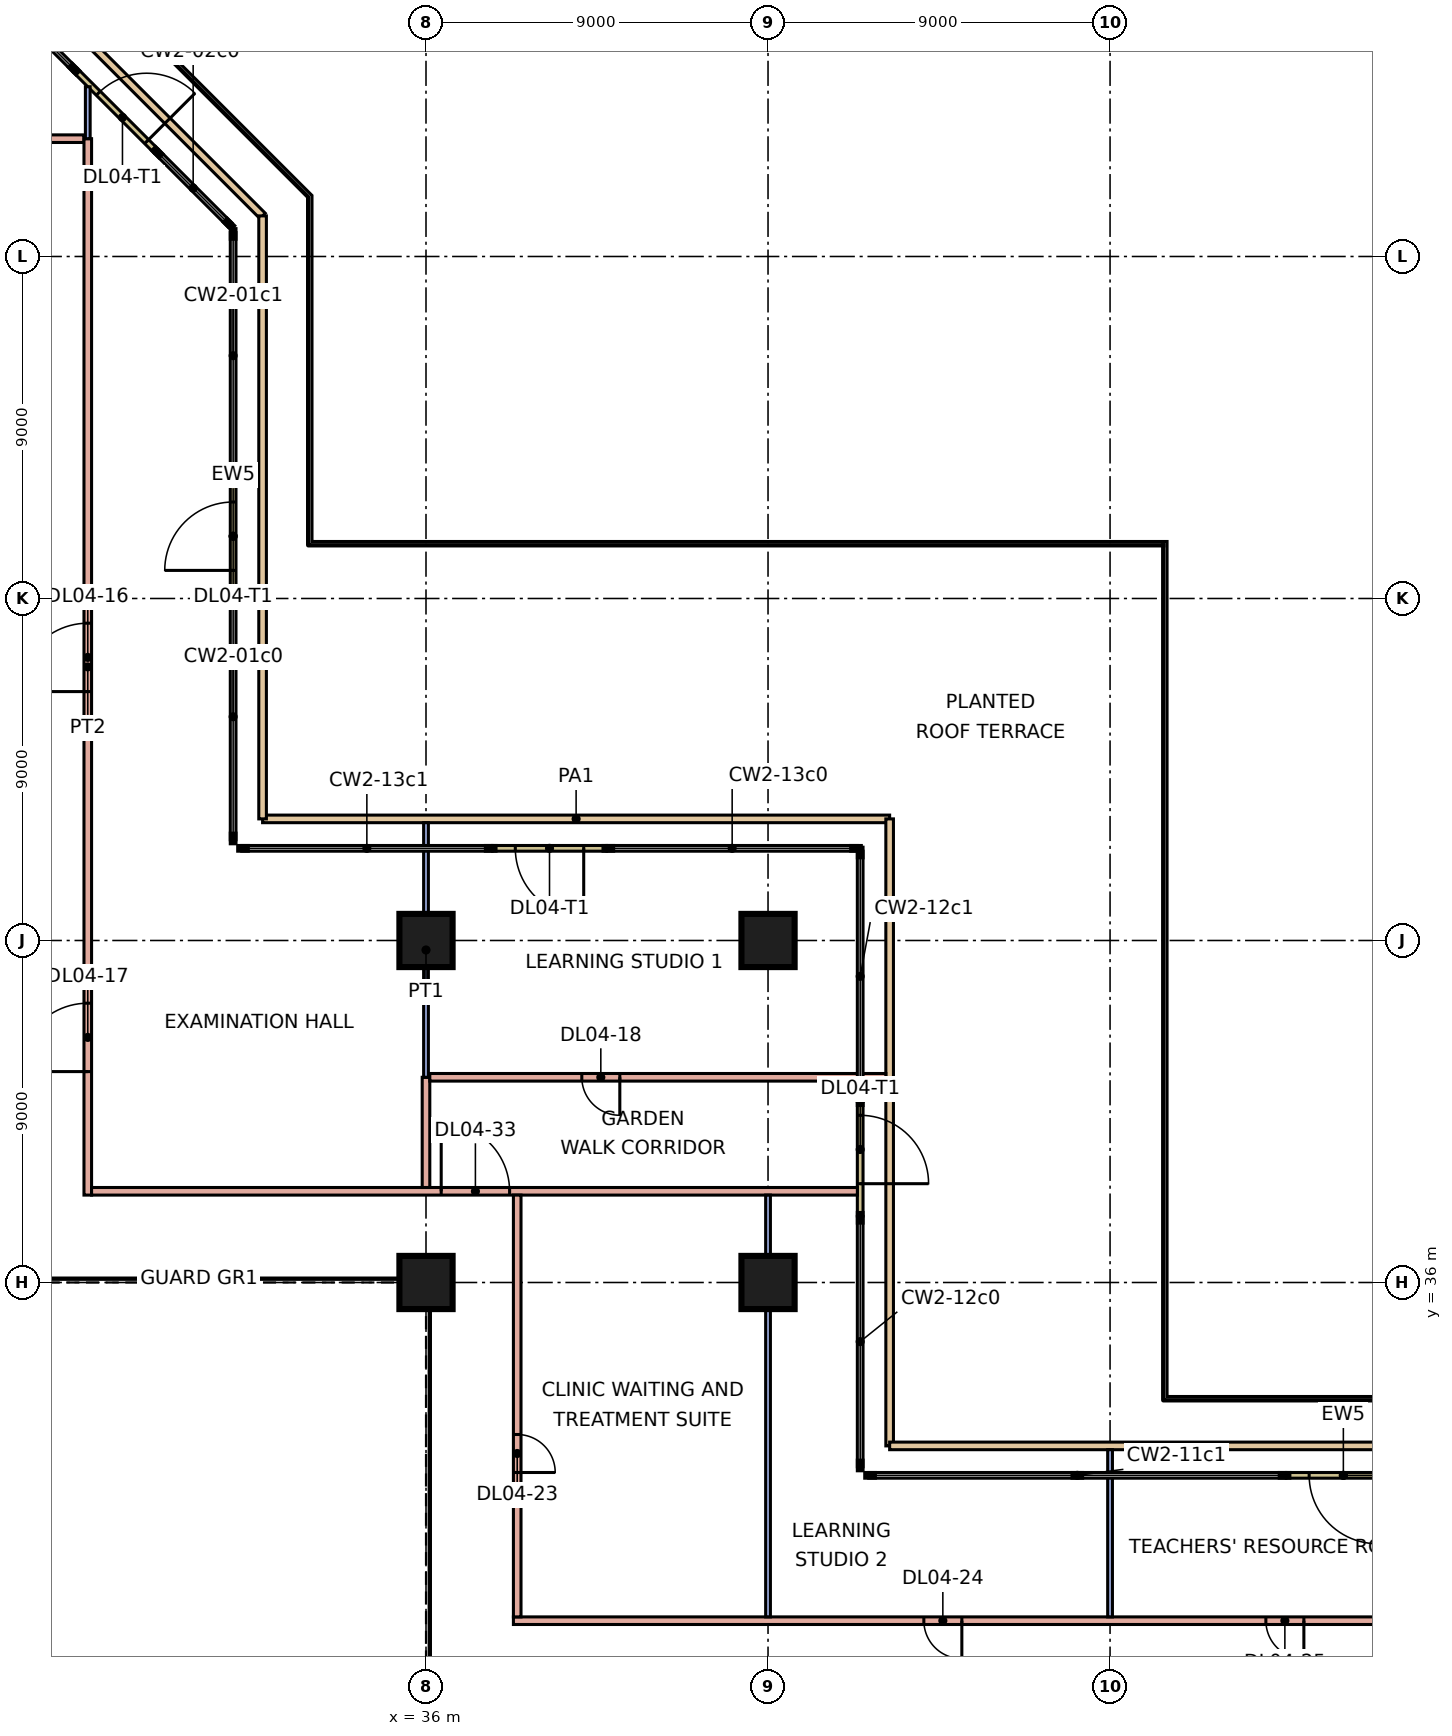
"""IFC4 building model, lengths in metres.
Left out: names, types, materials, properties, quantities, classifications, styles, units other than length and angle.
Written with IfcOpenShell. Run it as: python <this file> out.ifc"""

import sys

from ifc_helpers import new_model, si_unit, direction, frame, frame_2d, origin, origin_2d, place, context, subcontext, project, spatial, rectangle, extrude, element, fill, save


model = new_model("IFC4")
c1 = context("Model", 3, precision=1e-05, world=origin(), true_north=direction((0.0, 1.0)))
c2 = subcontext(c1, "Body", "Model", "MODEL_VIEW")
j1 = project(units=[si_unit("LENGTHUNIT", "METRE"), si_unit("PLANEANGLEUNIT", "RADIAN")], contexts=[c1])
p1 = place(None, origin())
s1 = spatial("IfcSite", under=j1, at=p1, CompositionType="ELEMENT")
p2 = place(p1, origin())
s2 = spatial("IfcBuilding", under=s1, at=p2, CompositionType="ELEMENT")
p3 = place(p2, frame((0.0, 0.0, 21.6)))
s3 = spatial("IfcBuildingStorey", under=s2, at=p3, CompositionType="ELEMENT", Elevation=21.6)
for number, where, z_axis, x_axis in (
    (1, (36.0, 36.0, 0.0), (0.0, 0.0, 1.0), (1.0, 0.0, 0.0)),
    (2, (45.0, 36.0, 0.0), (0.0, 0.0, 1.0), (1.0, 0.0, 0.0)),
    (3, (36.0, 45.0, 0.0), (0.0, 0.0, 1.0), (1.0, 0.0, 0.0)),
    (4, (45.0, 45.0, 0.0), (0.0, 0.0, 1.0), (1.0, 0.0, 0.0)),
):
    element("IfcColumn", number, at=place(p3, frame(where, z_axis=z_axis, x_axis=x_axis)), inside=s3, PredefinedType="COLUMN", context=c2, shape_type="SweptSolid", body=[
        extrude(rectangle(XDim=1.4, YDim=1.4, at=origin_2d()), origin(), (0.0, 0.0, 1.0), 4.8),
    ])
p4 = place(p3, frame((30.925, 54.139, 0.0), z_axis=(0.0, 0.0, 1.0), x_axis=(0.0, 1.0, 0.0)))
e5 = element("IfcWall", 5, at=p4, inside=s3, PredefinedType="SOLIDWALL", context=c2, shape_type="SweptSolid", body=[
    extrude(rectangle(XDim=3.0, YDim=0.15, at=frame_2d((1.5, 0.0))), origin(), (0.0, 0.0, 1.0), 4.4),
])
p5 = place(p4, frame((0.6, 0.0, 0.0)))
e6 = element("IfcOpeningElement", 6, at=p5, cuts=e5, PredefinedType="OPENING", context=c2, shape_type="SweptSolid", body=[
    extrude(rectangle(XDim=1.8, YDim=2.4, at=frame_2d((0.9, 1.2))), frame((0.0, 0.085, 0.0), z_axis=(0.0, -1.0, 0.0), x_axis=(1.0, 0.0, 0.0)), (0.0, 0.0, 1.0), 0.17),
])
p6 = place(p3, frame((28.897, 65.775, 0.0), z_axis=(0.0, 0.0, 1.0), x_axis=(-0.707106781187, 0.707106781187, 0.0)))
e7 = element("IfcWall", 7, at=p6, inside=s3, PredefinedType="SOLIDWALL", context=c2, shape_type="SweptSolid", body=[
    extrude(rectangle(XDim=3.0, YDim=0.15, at=frame_2d((1.5, 0.0))), origin(), (0.0, 0.0, 1.0), 4.4),
])
p7 = place(p6, frame((0.35, 0.0, 0.0)))
e8 = element("IfcOpeningElement", 8, at=p7, cuts=e7, PredefinedType="OPENING", context=c2, shape_type="SweptSolid", body=[
    extrude(rectangle(XDim=1.8, YDim=2.4, at=frame_2d((0.9, 1.2))), frame((0.0, 0.085, 0.0), z_axis=(0.0, -1.0, 0.0), x_axis=(1.0, 0.0, 0.0)), (0.0, 0.0, 1.0), 0.17),
])
p8 = place(p3, frame((61.639, 30.925, 0.0), z_axis=(0.0, 0.0, 1.0), x_axis=(-1.0, 0.0, 0.0)))
e9 = element("IfcWall", 9, at=p8, inside=s3, PredefinedType="SOLIDWALL", context=c2, shape_type="SweptSolid", body=[
    extrude(rectangle(XDim=3.0, YDim=0.15, at=frame_2d((1.5, 0.0))), origin(), (0.0, 0.0, 1.0), 4.4),
])
p9 = place(p8, frame((0.6, 0.0, 0.0)))
e10 = element("IfcOpeningElement", 10, at=p9, cuts=e9, PredefinedType="OPENING", context=c2, shape_type="SweptSolid", body=[
    extrude(rectangle(XDim=1.8, YDim=2.4, at=frame_2d((0.9, 1.2))), frame((0.0, 0.085, 0.0), z_axis=(0.0, -1.0, 0.0), x_axis=(1.0, 0.0, 0.0)), (0.0, 0.0, 1.0), 0.17),
])
p10 = place(p3, frame((47.425, 37.75, 0.0), z_axis=(0.0, 0.0, 1.0), x_axis=(0.0, 1.0, 0.0)))
e11 = element("IfcWall", 11, at=p10, inside=s3, PredefinedType="SOLIDWALL", context=c2, shape_type="SweptSolid", body=[
    extrude(rectangle(XDim=3.0, YDim=0.15, at=frame_2d((1.5, 0.0))), origin(), (0.0, 0.0, 1.0), 4.4),
])
p11 = place(p10, frame((0.85, 0.0, 0.0)))
e12 = element("IfcOpeningElement", 12, at=p11, cuts=e11, PredefinedType="OPENING", context=c2, shape_type="SweptSolid", body=[
    extrude(rectangle(XDim=1.8, YDim=2.4, at=frame_2d((0.9, 1.2))), frame((0.0, 0.085, 0.0), z_axis=(0.0, -1.0, 0.0), x_axis=(1.0, 0.0, 0.0)), (0.0, 0.0, 1.0), 0.17),
])
p12 = place(p3, frame((40.75, 47.425, 0.0), z_axis=(0.0, 0.0, 1.0), x_axis=(-1.0, 0.0, 0.0)))
e13 = element("IfcWall", 13, at=p12, inside=s3, PredefinedType="SOLIDWALL", context=c2, shape_type="SweptSolid", body=[
    extrude(rectangle(XDim=3.0, YDim=0.15, at=frame_2d((1.5, 0.0))), origin(), (0.0, 0.0, 1.0), 4.4),
])
p13 = place(p12, frame((0.6, 0.0, 0.0)))
e14 = element("IfcOpeningElement", 14, at=p13, cuts=e13, PredefinedType="OPENING", context=c2, shape_type="SweptSolid", body=[
    extrude(rectangle(XDim=1.8, YDim=2.4, at=frame_2d((0.9, 1.2))), frame((0.0, 0.085, 0.0), z_axis=(0.0, -1.0, 0.0), x_axis=(1.0, 0.0, 0.0)), (0.0, 0.0, 1.0), 0.17),
])
for number, where, z_axis, x_axis in (
    (15, (31.7, 48.2, 0.0), (0.0, 0.0, 1.0), (1.0, 0.0, 0.0)),
    (16, (48.2, 48.2, 0.0), (0.0, 0.0, 1.0), (0.0, -1.0, 0.0)),
):
    element("IfcWall", number, at=place(p3, frame(where, z_axis=z_axis, x_axis=x_axis)), inside=s3, PredefinedType="PARAPET", context=c2, shape_type="SweptSolid", body=[
        extrude(rectangle(XDim=16.5, YDim=0.2, at=frame_2d((8.25, 0.0))), origin(), (0.0, 0.0, 1.0), 0.5),
    ])
p14 = place(p3, frame((48.2, 31.7, 0.0), z_axis=(0.0, 0.0, 1.0), x_axis=(1.0, 0.0, 0.0)))
e17 = element("IfcWall", 17, at=p14, inside=s3, PredefinedType="PARAPET", context=c2, shape_type="SweptSolid", body=[
    extrude(rectangle(XDim=24.868, YDim=0.2, at=frame_2d((12.434, 0.0))), origin(), (0.0, 0.0, 1.0), 0.5),
])
p15 = place(p3, frame((25.068, 70.7, 0.0), z_axis=(0.0, 0.0, 1.0), x_axis=(0.707106781187, -0.707106781187, 0.0)))
e18 = element("IfcWall", 18, at=p15, inside=s3, PredefinedType="PARAPET", context=c2, shape_type="SweptSolid", body=[
    extrude(rectangle(XDim=9.379, YDim=0.2, at=frame_2d((4.689, 0.0))), origin(), (0.0, 0.0, 1.0), 0.5),
])
p16 = place(p3, frame((31.7, 64.068, 0.0), z_axis=(0.0, 0.0, 1.0), x_axis=(0.0, -1.0, 0.0)))
e19 = element("IfcWall", 19, at=p16, inside=s3, PredefinedType="PARAPET", context=c2, shape_type="SweptSolid", body=[
    extrude(rectangle(XDim=15.868, YDim=0.2, at=frame_2d((7.934, 0.0))), origin(), (0.0, 0.0, 1.0), 0.5),
])
p17 = place(p3, frame((-3.0, 66.1, 0.0), z_axis=(0.0, 0.0, 1.0), x_axis=(1.0, 0.0, 0.0)))
e20 = element("IfcWall", 20, at=p17, inside=s3, PredefinedType="PARTITIONING", context=c2, shape_type="SweptSolid", body=[
    extrude(rectangle(XDim=30.0, YDim=0.2, at=frame_2d((15.0, 0.0))), origin(), (0.0, 0.0, 1.0), 4.4),
])
p18 = place(p17, frame((8.6, 0.0, 0.0)))
e21 = element("IfcOpeningElement", 21, at=p18, cuts=e20, PredefinedType="OPENING", context=c2, shape_type="SweptSolid", body=[
    extrude(rectangle(XDim=1.0, YDim=2.1, at=frame_2d((0.5, 1.05))), frame((0.0, 0.11, 0.0), z_axis=(0.0, -1.0, 0.0), x_axis=(1.0, 0.0, 0.0)), (0.0, 0.0, 1.0), 0.22),
])
p19 = place(p17, frame((22.35, 0.0, 0.0)))
e22 = element("IfcOpeningElement", 22, at=p19, cuts=e20, PredefinedType="OPENING", context=c2, shape_type="SweptSolid", body=[
    extrude(rectangle(XDim=1.0, YDim=2.1, at=frame_2d((0.5, 1.05))), frame((0.0, 0.11, 0.0), z_axis=(0.0, -1.0, 0.0), x_axis=(1.0, 0.0, 0.0)), (0.0, 0.0, 1.0), 0.22),
])
p20 = place(p3, frame((27.1, 38.3, 0.0), z_axis=(0.0, 0.0, 1.0), x_axis=(0.0, 1.0, 0.0)))
e23 = element("IfcWall", 23, at=p20, inside=s3, PredefinedType="PARTITIONING", context=c2, shape_type="SweptSolid", body=[
    extrude(rectangle(XDim=27.8, YDim=0.2, at=frame_2d((13.9, 0.0))), origin(), (0.0, 0.0, 1.0), 4.4),
])
p21 = place(p20, frame((13.25, 0.0, 0.0)))
e24 = element("IfcOpeningElement", 24, at=p21, cuts=e23, PredefinedType="OPENING", context=c2, shape_type="SweptSolid", body=[
    extrude(rectangle(XDim=1.8, YDim=2.1, at=frame_2d((0.9, 1.05))), frame((0.0, 0.11, 0.0), z_axis=(0.0, -1.0, 0.0), x_axis=(1.0, 0.0, 0.0)), (0.0, 0.0, 1.0), 0.22),
])
p22 = place(p20, frame((3.25, 0.0, 0.0)))
e25 = element("IfcOpeningElement", 25, at=p22, cuts=e23, PredefinedType="OPENING", context=c2, shape_type="SweptSolid", body=[
    extrude(rectangle(XDim=1.8, YDim=2.1, at=frame_2d((0.9, 1.05))), frame((0.0, 0.11, 0.0), z_axis=(0.0, -1.0, 0.0), x_axis=(1.0, 0.0, 0.0)), (0.0, 0.0, 1.0), 0.22),
])
p23 = place(p3, frame((27.1, 66.1, 0.0), z_axis=(0.0, 0.0, 1.0), x_axis=(0.0, 1.0, 0.0)))
e26 = element("IfcWall", 26, at=p23, inside=s3, PredefinedType="PARTITIONING", context=c2, shape_type="SweptSolid", body=[
    extrude(rectangle(XDim=1.367, YDim=0.125, at=frame_2d((0.684, 0.0))), origin(), (0.0, 0.0, 1.0), 4.4),
])
p24 = place(p3, frame((27.2, 38.4, 0.0), z_axis=(0.0, 0.0, 1.0), x_axis=(1.0, 0.0, 0.0)))
e27 = element("IfcWall", 27, at=p24, inside=s3, PredefinedType="PARTITIONING", context=c2, shape_type="SweptSolid", body=[
    extrude(rectangle(XDim=20.151, YDim=0.2, at=frame_2d((10.076, 0.0))), origin(), (0.0, 0.0, 1.0), 4.4),
])
p25 = place(p24, frame((9.2, 0.0, 0.0)))
e28 = element("IfcOpeningElement", 28, at=p25, cuts=e27, PredefinedType="OPENING", context=c2, shape_type="SweptSolid", body=[
    extrude(rectangle(XDim=1.8, YDim=2.1, at=frame_2d((0.9, 1.05))), frame((0.0, 0.11, 0.0), z_axis=(0.0, -1.0, 0.0), x_axis=(1.0, 0.0, 0.0)), (0.0, 0.0, 1.0), 0.22),
])
p26 = place(p3, frame((36.0, 38.5, 0.0), z_axis=(0.0, 0.0, 1.0), x_axis=(0.0, 1.0, 0.0)))
e29 = element("IfcWall", 29, at=p26, inside=s3, PredefinedType="PARTITIONING", context=c2, shape_type="SweptSolid", body=[
    extrude(rectangle(XDim=2.9, YDim=0.2, at=frame_2d((1.45, 0.0))), origin(), (0.0, 0.0, 1.0), 4.4),
])
p27 = place(p3, frame((36.0, 41.4, 0.0), z_axis=(0.0, 0.0, 1.0), x_axis=(0.0, 1.0, 0.0)))
e30 = element("IfcWall", 30, at=p27, inside=s3, PredefinedType="PARTITIONING", context=c2, shape_type="SweptSolid", body=[
    extrude(rectangle(XDim=6.7, YDim=0.125, at=frame_2d((3.35, 0.0))), origin(), (0.0, 0.0, 1.0), 4.4),
])
p28 = place(p3, frame((36.1, 41.4, 0.0), z_axis=(0.0, 0.0, 1.0), x_axis=(1.0, 0.0, 0.0)))
e31 = element("IfcWall", 31, at=p28, inside=s3, PredefinedType="PARTITIONING", context=c2, shape_type="SweptSolid", body=[
    extrude(rectangle(XDim=12.0, YDim=0.2, at=frame_2d((6.0, 0.0))), origin(), (0.0, 0.0, 1.0), 4.4),
])
p29 = place(p28, frame((4.0, 0.0, 0.0)))
e32 = element("IfcOpeningElement", 32, at=p29, cuts=e31, PredefinedType="OPENING", context=c2, shape_type="SweptSolid", body=[
    extrude(rectangle(XDim=1.0, YDim=2.1, at=frame_2d((0.5, 1.05))), frame((0.0, 0.11, 0.0), z_axis=(0.0, -1.0, 0.0), x_axis=(1.0, 0.0, 0.0)), (0.0, 0.0, 1.0), 0.22),
])
p30 = place(p3, frame((38.3, 27.1, 0.0), z_axis=(0.0, 0.0, 1.0), x_axis=(1.0, 0.0, 0.0)))
e33 = element("IfcWall", 33, at=p30, inside=s3, PredefinedType="PARTITIONING", context=c2, shape_type="SweptSolid", body=[
    extrude(rectangle(XDim=36.9, YDim=0.2, at=frame_2d((18.45, 0.0))), origin(), (0.0, 0.0, 1.0), 4.4),
])
p31 = place(p30, frame((10.8, 0.0, 0.0)))
e34 = element("IfcOpeningElement", 34, at=p31, cuts=e33, PredefinedType="OPENING", context=c2, shape_type="SweptSolid", body=[
    extrude(rectangle(XDim=1.0, YDim=2.1, at=frame_2d((0.5, 1.05))), frame((0.0, 0.11, 0.0), z_axis=(0.0, -1.0, 0.0), x_axis=(1.0, 0.0, 0.0)), (0.0, 0.0, 1.0), 0.22),
])
p32 = place(p30, frame((19.8, 0.0, 0.0)))
e35 = element("IfcOpeningElement", 35, at=p32, cuts=e33, PredefinedType="OPENING", context=c2, shape_type="SweptSolid", body=[
    extrude(rectangle(XDim=1.0, YDim=2.1, at=frame_2d((0.5, 1.05))), frame((0.0, 0.11, 0.0), z_axis=(0.0, -1.0, 0.0), x_axis=(1.0, 0.0, 0.0)), (0.0, 0.0, 1.0), 0.22),
])
p33 = place(p30, frame((28.8, 0.0, 0.0)))
e36 = element("IfcOpeningElement", 36, at=p33, cuts=e33, PredefinedType="OPENING", context=c2, shape_type="SweptSolid", body=[
    extrude(rectangle(XDim=1.0, YDim=2.1, at=frame_2d((0.5, 1.05))), frame((0.0, 0.11, 0.0), z_axis=(0.0, -1.0, 0.0), x_axis=(1.0, 0.0, 0.0)), (0.0, 0.0, 1.0), 0.22),
])
p34 = place(p3, frame((38.4, 27.2, 0.0), z_axis=(0.0, 0.0, 1.0), x_axis=(0.0, 1.0, 0.0)))
e37 = element("IfcWall", 37, at=p34, inside=s3, PredefinedType="PARTITIONING", context=c2, shape_type="SweptSolid", body=[
    extrude(rectangle(XDim=11.1, YDim=0.2, at=frame_2d((5.55, 0.0))), origin(), (0.0, 0.0, 1.0), 4.4),
])
p35 = place(p34, frame((3.8, 0.0, 0.0)))
e38 = element("IfcOpeningElement", 38, at=p35, cuts=e37, PredefinedType="OPENING", context=c2, shape_type="SweptSolid", body=[
    extrude(rectangle(XDim=1.0, YDim=2.1, at=frame_2d((0.5, 1.05))), frame((0.0, 0.11, 0.0), z_axis=(0.0, -1.0, 0.0), x_axis=(1.0, 0.0, 0.0)), (0.0, 0.0, 1.0), 0.22),
])
p36 = place(p3, frame((45.0, 27.2, 0.0), z_axis=(0.0, 0.0, 1.0), x_axis=(0.0, 1.0, 0.0)))
e39 = element("IfcWall", 39, at=p36, inside=s3, PredefinedType="PARTITIONING", context=c2, shape_type="SweptSolid", body=[
    extrude(rectangle(XDim=11.1, YDim=0.125, at=frame_2d((5.55, 0.0))), origin(), (0.0, 0.0, 1.0), 4.4),
])
p37 = place(p3, frame((54.0, 27.2, 0.0), z_axis=(0.0, 0.0, 1.0), x_axis=(0.0, 1.0, 0.0)))
e40 = element("IfcWall", 40, at=p37, inside=s3, PredefinedType="PARTITIONING", context=c2, shape_type="SweptSolid", body=[
    extrude(rectangle(XDim=4.4, YDim=0.125, at=frame_2d((2.2, 0.0))), origin(), (0.0, 0.0, 1.0), 4.4),
])
p38 = place(p5, origin())
e41 = element("IfcDoor", 41, at=p38, inside=s3, OperationType="DOUBLE_DOOR_SINGLE_SWING", PredefinedType="DOOR", context=c2, shape_type="SweptSolid", body=[
    extrude(rectangle(XDim=1.8, YDim=2.4, at=frame_2d((0.9, 1.2))), frame((0.0, 0.025, 0.0), z_axis=(0.0, -1.0, 0.0), x_axis=(1.0, 0.0, 0.0)), (0.0, 0.0, 1.0), 0.05),
])
fill(e6, e41)
p39 = place(p7, frame((1.8, 0.0, 0.0), z_axis=(0.0, 0.0, 1.0), x_axis=(-1.0, 0.0, 0.0)))
e42 = element("IfcDoor", 42, at=p39, inside=s3, OperationType="DOUBLE_DOOR_SINGLE_SWING", PredefinedType="DOOR", context=c2, shape_type="SweptSolid", body=[
    extrude(rectangle(XDim=1.8, YDim=2.4, at=frame_2d((0.9, 1.2))), frame((0.0, 0.025, 0.0), z_axis=(0.0, -1.0, 0.0), x_axis=(1.0, 0.0, 0.0)), (0.0, 0.0, 1.0), 0.05),
])
fill(e8, e42)
p40 = place(p9, origin())
e43 = element("IfcDoor", 43, at=p40, inside=s3, OperationType="DOUBLE_DOOR_SINGLE_SWING", PredefinedType="DOOR", context=c2, shape_type="SweptSolid", body=[
    extrude(rectangle(XDim=1.8, YDim=2.4, at=frame_2d((0.9, 1.2))), frame((0.0, 0.025, 0.0), z_axis=(0.0, -1.0, 0.0), x_axis=(1.0, 0.0, 0.0)), (0.0, 0.0, 1.0), 0.05),
])
fill(e10, e43)
p41 = place(p11, frame((1.8, 0.0, 0.0), z_axis=(0.0, 0.0, 1.0), x_axis=(-1.0, 0.0, 0.0)))
e44 = element("IfcDoor", 44, at=p41, inside=s3, OperationType="DOUBLE_DOOR_SINGLE_SWING", PredefinedType="DOOR", context=c2, shape_type="SweptSolid", body=[
    extrude(rectangle(XDim=1.8, YDim=2.4, at=frame_2d((0.9, 1.2))), frame((0.0, 0.025, 0.0), z_axis=(0.0, -1.0, 0.0), x_axis=(1.0, 0.0, 0.0)), (0.0, 0.0, 1.0), 0.05),
])
fill(e12, e44)
p42 = place(p13, origin())
e45 = element("IfcDoor", 45, at=p42, inside=s3, OperationType="DOUBLE_DOOR_SINGLE_SWING", PredefinedType="DOOR", context=c2, shape_type="SweptSolid", body=[
    extrude(rectangle(XDim=1.8, YDim=2.4, at=frame_2d((0.9, 1.2))), frame((0.0, 0.025, 0.0), z_axis=(0.0, -1.0, 0.0), x_axis=(1.0, 0.0, 0.0)), (0.0, 0.0, 1.0), 0.05),
])
fill(e14, e45)
p43 = place(p21, origin())
e46 = element("IfcDoor", 46, at=p43, inside=s3, OperationType="DOUBLE_DOOR_SINGLE_SWING", PredefinedType="DOOR", context=c2, shape_type="SweptSolid", body=[
    extrude(rectangle(XDim=1.8, YDim=2.1, at=frame_2d((0.9, 1.05))), frame((0.0, 0.025, 0.0), z_axis=(0.0, -1.0, 0.0), x_axis=(1.0, 0.0, 0.0)), (0.0, 0.0, 1.0), 0.05),
])
fill(e24, e46)
p44 = place(p22, origin())
e47 = element("IfcDoor", 47, at=p44, inside=s3, OperationType="DOUBLE_DOOR_SINGLE_SWING", PredefinedType="DOOR", context=c2, shape_type="SweptSolid", body=[
    extrude(rectangle(XDim=1.8, YDim=2.1, at=frame_2d((0.9, 1.05))), frame((0.0, 0.025, 0.0), z_axis=(0.0, -1.0, 0.0), x_axis=(1.0, 0.0, 0.0)), (0.0, 0.0, 1.0), 0.05),
])
fill(e25, e47)
p45 = place(p29, origin())
e48 = element("IfcDoor", 48, at=p45, inside=s3, OperationType="SINGLE_SWING_RIGHT", PredefinedType="DOOR", context=c2, shape_type="SweptSolid", body=[
    extrude(rectangle(XDim=1.0, YDim=2.1, at=frame_2d((0.5, 1.05))), frame((0.0, 0.025, 0.0), z_axis=(0.0, -1.0, 0.0), x_axis=(1.0, 0.0, 0.0)), (0.0, 0.0, 1.0), 0.05),
])
fill(e32, e48)
p46 = place(p35, frame((1.0, 0.0, 0.0), z_axis=(0.0, 0.0, 1.0), x_axis=(-1.0, 0.0, 0.0)))
e49 = element("IfcDoor", 49, at=p46, inside=s3, OperationType="SINGLE_SWING_LEFT", PredefinedType="DOOR", context=c2, shape_type="SweptSolid", body=[
    extrude(rectangle(XDim=1.0, YDim=2.1, at=frame_2d((0.5, 1.05))), frame((0.0, 0.025, 0.0), z_axis=(0.0, -1.0, 0.0), x_axis=(1.0, 0.0, 0.0)), (0.0, 0.0, 1.0), 0.05),
])
fill(e38, e49)
p47 = place(p31, origin())
e50 = element("IfcDoor", 50, at=p47, inside=s3, OperationType="SINGLE_SWING_RIGHT", PredefinedType="DOOR", context=c2, shape_type="SweptSolid", body=[
    extrude(rectangle(XDim=1.0, YDim=2.1, at=frame_2d((0.5, 1.05))), frame((0.0, 0.025, 0.0), z_axis=(0.0, -1.0, 0.0), x_axis=(1.0, 0.0, 0.0)), (0.0, 0.0, 1.0), 0.05),
])
fill(e34, e50)
p48 = place(p32, origin())
e51 = element("IfcDoor", 51, at=p48, inside=s3, OperationType="SINGLE_SWING_RIGHT", PredefinedType="DOOR", context=c2, shape_type="SweptSolid", body=[
    extrude(rectangle(XDim=1.0, YDim=2.1, at=frame_2d((0.5, 1.05))), frame((0.0, 0.025, 0.0), z_axis=(0.0, -1.0, 0.0), x_axis=(1.0, 0.0, 0.0)), (0.0, 0.0, 1.0), 0.05),
])
fill(e35, e51)
p49 = place(p25, origin())
e52 = element("IfcDoor", 52, at=p49, inside=s3, OperationType="DOUBLE_DOOR_SINGLE_SWING", PredefinedType="DOOR", context=c2, shape_type="SweptSolid", body=[
    extrude(rectangle(XDim=1.8, YDim=2.1, at=frame_2d((0.9, 1.05))), frame((0.0, 0.025, 0.0), z_axis=(0.0, -1.0, 0.0), x_axis=(1.0, 0.0, 0.0)), (0.0, 0.0, 1.0), 0.05),
])
fill(e28, e52)
save(model, sys.argv[1])
